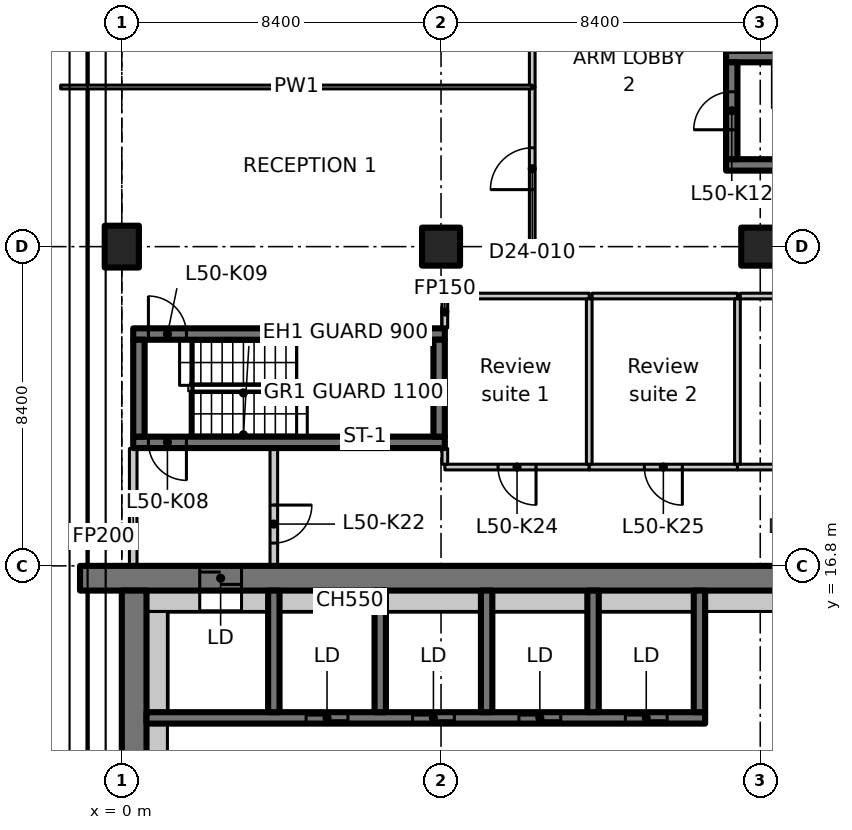
"""IFC4 building model, lengths in metres.
Left out: names, types, materials, properties, quantities, classifications, styles, units other than length and angle.
Written with IfcOpenShell. Run it as: python <this file> out.ifc"""

import sys

from ifc_helpers import new_model, si_unit, direction, frame, frame_2d, origin, origin_2d, place, context, subcontext, project, spatial, polyline, rectangle, outline, extrude, element, fill, save


model = new_model("IFC4")
c1 = context("Model", 3, precision=1e-05, world=origin(), true_north=direction((0.0, 1.0)))
c2 = subcontext(c1, "Body", "Model", "MODEL_VIEW")
j1 = project(units=[si_unit("LENGTHUNIT", "METRE"), si_unit("PLANEANGLEUNIT", "RADIAN")], contexts=[c1])
p1 = place(None, origin())
s1 = spatial("IfcSite", under=j1, at=p1, CompositionType="ELEMENT")
p2 = place(p1, origin())
s2 = spatial("IfcBuilding", under=s1, at=p2, CompositionType="ELEMENT")
p3 = place(p2, frame((0.0, 0.0, 199.2)))
s3 = spatial("IfcBuildingStorey", under=s2, at=p3, CompositionType="ELEMENT", Elevation=199.2)
p4 = place(p3, frame((0.0, 25.2, 0.0), z_axis=(0.0, 0.0, 1.0), x_axis=(1.0, 0.0, 0.0)))
e1 = element("IfcColumn", 1, at=p4, inside=s3, PredefinedType="COLUMN", context=c2, shape_type="SweptSolid", body=[
    extrude(rectangle(XDim=0.9, YDim=1.1, at=origin_2d()), origin(), (0.0, 0.0, 1.0), 3.35),
])
for number, where, z_axis, x_axis in (
    (2, (8.4, 25.2, 0.0), (0.0, 0.0, 1.0), (1.0, 0.0, 0.0)),
    (3, (16.8, 25.2, 0.0), (0.0, 0.0, 1.0), (1.0, 0.0, 0.0)),
):
    element("IfcColumn", number, at=place(p3, frame(where, z_axis=z_axis, x_axis=x_axis)), inside=s3, PredefinedType="COLUMN", context=c2, shape_type="SweptSolid", body=[
        extrude(rectangle(XDim=1.0, YDim=1.0, at=origin_2d()), origin(), (0.0, 0.0, 1.0), 3.35),
    ])
p5 = place(p3, frame((-1.1, 16.475, 0.0), z_axis=(0.0, 0.0, 1.0), x_axis=(1.0, 0.0, 0.0)))
e4 = element("IfcWall", 4, at=p5, inside=s3, PredefinedType="SHEAR", context=c2, shape_type="SweptSolid", body=[
    extrude(rectangle(XDim=22.1, YDim=0.65, at=frame_2d((11.05, 0.0))), origin(), (0.0, 0.0, 1.0), 3.35),
])
p6 = place(p5, frame((3.15, 0.0, 0.0)))
e5 = element("IfcOpeningElement", 5, at=p6, cuts=e4, PredefinedType="OPENING", context=c2, shape_type="SweptSolid", body=[
    extrude(rectangle(XDim=1.1, YDim=2.3, at=frame_2d((0.55, 1.15))), frame((0.0, 0.335, 0.0), z_axis=(0.0, -1.0, 0.0), x_axis=(1.0, 0.0, 0.0)), (0.0, 0.0, 1.0), 0.67),
])
p7 = place(p3, frame((0.325, 7.286, 0.0), z_axis=(0.0, 0.0, 1.0), x_axis=(0.0, 1.0, 0.0)))
e6 = element("IfcWall", 6, at=p7, inside=s3, PredefinedType="SHEAR", context=c2, shape_type="SweptSolid", body=[
    extrude(rectangle(XDim=8.864, YDim=0.65, at=frame_2d((4.432, 0.0))), origin(), (0.0, 0.0, 1.0), 3.35),
])
p8 = place(p3, frame((0.65, 15.875, 0.0), z_axis=(0.0, 0.0, 1.0), x_axis=(1.0, 0.0, 0.0)))
e7 = element("IfcWall", 7, at=p8, inside=s3, PredefinedType="PARTITIONING", context=c2, shape_type="SweptSolid", body=[
    extrude(rectangle(XDim=1.4, YDim=0.55, at=frame_2d((0.7, 0.0))), origin(), (0.0, 0.0, 1.0), 3.35),
])
p9 = place(p3, frame((0.65, 12.8, 0.0), z_axis=(0.0, 0.0, 1.0), x_axis=(1.0, 0.0, 0.0)))
e8 = element("IfcWall", 8, at=p9, inside=s3, PredefinedType="SHEAR", context=c2, shape_type="SweptSolid", body=[
    extrude(rectangle(XDim=14.7, YDim=0.3, at=frame_2d((7.35, 0.0))), origin(), (0.0, 0.0, 1.0), 3.35),
])
p10 = place(p9, frame((4.2, 0.0, 0.0)))
e9 = element("IfcOpeningElement", 9, at=p10, cuts=e8, PredefinedType="OPENING", context=c2, shape_type="SweptSolid", body=[
    extrude(rectangle(XDim=1.1, YDim=2.3, at=frame_2d((0.55, 1.15))), frame((0.0, 0.16, 0.0), z_axis=(0.0, -1.0, 0.0), x_axis=(1.0, 0.0, 0.0)), (0.0, 0.0, 1.0), 0.32),
])
p11 = place(p9, frame((7.0, 0.0, 0.0)))
e10 = element("IfcOpeningElement", 10, at=p11, cuts=e8, PredefinedType="OPENING", context=c2, shape_type="SweptSolid", body=[
    extrude(rectangle(XDim=1.1, YDim=2.3, at=frame_2d((0.55, 1.15))), frame((0.0, 0.16, 0.0), z_axis=(0.0, -1.0, 0.0), x_axis=(1.0, 0.0, 0.0)), (0.0, 0.0, 1.0), 0.32),
])
p12 = place(p9, frame((9.8, 0.0, 0.0)))
e11 = element("IfcOpeningElement", 11, at=p12, cuts=e8, PredefinedType="OPENING", context=c2, shape_type="SweptSolid", body=[
    extrude(rectangle(XDim=1.1, YDim=2.3, at=frame_2d((0.55, 1.15))), frame((0.0, 0.16, 0.0), z_axis=(0.0, -1.0, 0.0), x_axis=(1.0, 0.0, 0.0)), (0.0, 0.0, 1.0), 0.32),
])
p13 = place(p9, frame((12.6, 0.0, 0.0)))
e12 = element("IfcOpeningElement", 12, at=p13, cuts=e8, PredefinedType="OPENING", context=c2, shape_type="SweptSolid", body=[
    extrude(rectangle(XDim=1.1, YDim=2.3, at=frame_2d((0.55, 1.15))), frame((0.0, 0.16, 0.0), z_axis=(0.0, -1.0, 0.0), x_axis=(1.0, 0.0, 0.0)), (0.0, 0.0, 1.0), 0.32),
])
for number, where, z_axis, x_axis in (
    (13, (4.0, 12.95, 0.0), (0.0, 0.0, 1.0), (0.0, 1.0, 0.0)),
    (14, (6.8, 12.95, 0.0), (0.0, 0.0, 1.0), (0.0, 1.0, 0.0)),
    (15, (9.6, 12.95, 0.0), (0.0, 0.0, 1.0), (0.0, 1.0, 0.0)),
    (16, (12.4, 12.95, 0.0), (0.0, 0.0, 1.0), (0.0, 1.0, 0.0)),
    (17, (15.2, 12.95, 0.0), (0.0, 0.0, 1.0), (0.0, 1.0, 0.0)),
):
    element("IfcWall", number, at=place(p3, frame(where, z_axis=z_axis, x_axis=x_axis)), inside=s3, PredefinedType="SHEAR", context=c2, shape_type="SweptSolid", body=[
        extrude(rectangle(XDim=3.2, YDim=0.3, at=frame_2d((1.6, 0.0))), origin(), (0.0, 0.0, 1.0), 3.35),
    ])
p14 = place(p3, frame((8.5, 20.05, 0.0), z_axis=(0.0, 0.0, 1.0), x_axis=(-1.0, 0.0, 0.0)))
e18 = element("IfcWall", 18, at=p14, inside=s3, PredefinedType="SHEAR", context=c2, shape_type="SweptSolid", body=[
    extrude(rectangle(XDim=8.2, YDim=0.3, at=frame_2d((4.1, 0.0))), origin(), (0.0, 0.0, 1.0), 3.35),
])
p15 = place(p14, frame((6.8, 0.0, 0.0)))
e19 = element("IfcOpeningElement", 19, at=p15, cuts=e18, PredefinedType="OPENING", context=c2, shape_type="SweptSolid", body=[
    extrude(rectangle(XDim=1.0, YDim=2.1, at=frame_2d((0.5, 1.05))), frame((0.0, 0.16, 0.0), z_axis=(0.0, -1.0, 0.0), x_axis=(1.0, 0.0, 0.0)), (0.0, 0.0, 1.0), 0.32),
])
p16 = place(p3, frame((0.3, 22.9, 0.0), z_axis=(0.0, 0.0, 1.0), x_axis=(1.0, 0.0, 0.0)))
e20 = element("IfcWall", 20, at=p16, inside=s3, PredefinedType="SHEAR", context=c2, shape_type="SweptSolid", body=[
    extrude(rectangle(XDim=8.2, YDim=0.3, at=frame_2d((4.1, 0.0))), origin(), (0.0, 0.0, 1.0), 3.35),
])
p17 = place(p16, frame((0.4, 0.0, 0.0)))
e21 = element("IfcOpeningElement", 21, at=p17, cuts=e20, PredefinedType="OPENING", context=c2, shape_type="SweptSolid", body=[
    extrude(rectangle(XDim=1.0, YDim=2.1, at=frame_2d((0.5, 1.05))), frame((0.0, 0.16, 0.0), z_axis=(0.0, -1.0, 0.0), x_axis=(1.0, 0.0, 0.0)), (0.0, 0.0, 1.0), 0.32),
])
for number, where, z_axis, x_axis in (
    (22, (0.45, 20.2, 0.0), (0.0, 0.0, 1.0), (0.0, 1.0, 0.0)),
    (23, (8.35, 20.2, 0.0), (0.0, 0.0, 1.0), (0.0, 1.0, 0.0)),
):
    element("IfcWall", number, at=place(p3, frame(where, z_axis=z_axis, x_axis=x_axis)), inside=s3, PredefinedType="SHEAR", context=c2, shape_type="SweptSolid", body=[
        extrude(rectangle(XDim=2.55, YDim=0.3, at=frame_2d((1.275, 0.0))), origin(), (0.0, 0.0, 1.0), 3.35),
    ])
for number, where, z_axis, x_axis in (
    (24, (15.9, 27.35, 0.0), (0.0, 0.0, 1.0), (1.0, 0.0, 0.0)),
    (25, (15.9, 30.2, 0.0), (0.0, 0.0, 1.0), (1.0, 0.0, 0.0)),
):
    element("IfcWall", number, at=place(p3, frame(where, z_axis=z_axis, x_axis=x_axis)), inside=s3, PredefinedType="SHEAR", context=c2, shape_type="SweptSolid", body=[
        extrude(rectangle(XDim=8.2, YDim=0.3, at=frame_2d((4.1, 0.0))), origin(), (0.0, 0.0, 1.0), 3.35),
    ])
p18 = place(p3, frame((16.05, 27.5, 0.0), z_axis=(0.0, 0.0, 1.0), x_axis=(0.0, 1.0, 0.0)))
e26 = element("IfcWall", 26, at=p18, inside=s3, PredefinedType="SHEAR", context=c2, shape_type="SweptSolid", body=[
    extrude(rectangle(XDim=2.55, YDim=0.3, at=frame_2d((1.275, 0.0))), origin(), (0.0, 0.0, 1.0), 3.35),
])
p19 = place(p18, frame((0.775, 0.0, 0.0)))
e27 = element("IfcOpeningElement", 27, at=p19, cuts=e26, PredefinedType="OPENING", context=c2, shape_type="SweptSolid", body=[
    extrude(rectangle(XDim=1.0, YDim=2.1, at=frame_2d((0.5, 1.05))), frame((0.0, 0.16, 0.0), z_axis=(0.0, -1.0, 0.0), x_axis=(1.0, 0.0, 0.0)), (0.0, 0.0, 1.0), 0.32),
])
p20 = place(p3, frame((0.3, 16.812, 0.0), z_axis=(0.0, 0.0, 1.0), x_axis=(0.0, 1.0, 0.0)))
e28 = element("IfcWall", 28, at=p20, inside=s3, PredefinedType="PARTITIONING", context=c2, shape_type="SweptSolid", body=[
    extrude(rectangle(XDim=3.076, YDim=0.2, at=frame_2d((1.538, 0.0))), origin(), (0.0, 0.0, 1.0), 2.98),
])
p21 = place(p3, frame((4.0, 19.888, 0.0), z_axis=(0.0, 0.0, 1.0), x_axis=(0.0, -1.0, 0.0)))
e29 = element("IfcWall", 29, at=p21, inside=s3, PredefinedType="PARTITIONING", context=c2, shape_type="SweptSolid", body=[
    extrude(rectangle(XDim=3.076, YDim=0.2, at=frame_2d((1.538, 0.0))), origin(), (0.0, 0.0, 1.0), 3.35),
])
p22 = place(p21, frame((1.488, 0.0, 0.0)))
e30 = element("IfcOpeningElement", 30, at=p22, cuts=e29, PredefinedType="OPENING", context=c2, shape_type="SweptSolid", body=[
    extrude(rectangle(XDim=1.0, YDim=2.1, at=frame_2d((0.5, 1.05))), frame((0.0, 0.11, 0.0), z_axis=(0.0, -1.0, 0.0), x_axis=(1.0, 0.0, 0.0)), (0.0, 0.0, 1.0), 0.22),
])
p23 = place(p3, frame((12.3, 19.4, 0.0), z_axis=(0.0, 0.0, 1.0), x_axis=(-1.0, 0.0, 0.0)))
e31 = element("IfcWall", 31, at=p23, inside=s3, PredefinedType="PARTITIONING", context=c2, shape_type="SweptSolid", body=[
    extrude(rectangle(XDim=3.8, YDim=0.15, at=frame_2d((1.9, 0.0))), origin(), (0.0, 0.0, 1.0), 3.35),
])
p24 = place(p23, frame((1.4, 0.0, 0.0)))
e32 = element("IfcOpeningElement", 32, at=p24, cuts=e31, PredefinedType="OPENING", context=c2, shape_type="SweptSolid", body=[
    extrude(rectangle(XDim=1.0, YDim=2.1, at=frame_2d((0.5, 1.05))), frame((0.0, 0.085, 0.0), z_axis=(0.0, -1.0, 0.0), x_axis=(1.0, 0.0, 0.0)), (0.0, 0.0, 1.0), 0.17),
])
p25 = place(p3, frame((8.5, 19.475, 0.0), z_axis=(0.0, 0.0, 1.0), x_axis=(0.0, 1.0, 0.0)))
e33 = element("IfcWall", 33, at=p25, inside=s3, PredefinedType="PARTITIONING", context=c2, shape_type="SweptSolid", body=[
    extrude(rectangle(XDim=0.413, YDim=0.15, at=frame_2d((0.207, 0.0))), origin(), (0.0, 0.0, 1.0), 3.35),
])
p26 = place(p3, frame((8.5, 23.062, 0.0), z_axis=(0.0, 0.0, 1.0), x_axis=(0.0, 1.0, 0.0)))
e34 = element("IfcWall", 34, at=p26, inside=s3, PredefinedType="PARTITIONING", context=c2, shape_type="SweptSolid", body=[
    extrude(rectangle(XDim=0.838, YDim=0.15, at=frame_2d((0.419, 0.0))), origin(), (0.0, 0.0, 1.0), 3.35),
])
p27 = place(p3, frame((8.575, 23.9, 0.0), z_axis=(0.0, 0.0, 1.0), x_axis=(1.0, 0.0, 0.0)))
e35 = element("IfcWall", 35, at=p27, inside=s3, PredefinedType="PARTITIONING", context=c2, shape_type="SweptSolid", body=[
    extrude(rectangle(XDim=3.725, YDim=0.15, at=frame_2d((1.863, 0.0))), origin(), (0.0, 0.0, 1.0), 3.35),
])
p28 = place(p3, frame((16.2, 19.4, 0.0), z_axis=(0.0, 0.0, 1.0), x_axis=(-1.0, 0.0, 0.0)))
e36 = element("IfcWall", 36, at=p28, inside=s3, PredefinedType="PARTITIONING", context=c2, shape_type="SweptSolid", body=[
    extrude(rectangle(XDim=3.9, YDim=0.15, at=frame_2d((1.95, 0.0))), origin(), (0.0, 0.0, 1.0), 3.35),
])
p29 = place(p28, frame((1.45, 0.0, 0.0)))
e37 = element("IfcOpeningElement", 37, at=p29, cuts=e36, PredefinedType="OPENING", context=c2, shape_type="SweptSolid", body=[
    extrude(rectangle(XDim=1.0, YDim=2.1, at=frame_2d((0.5, 1.05))), frame((0.0, 0.085, 0.0), z_axis=(0.0, -1.0, 0.0), x_axis=(1.0, 0.0, 0.0)), (0.0, 0.0, 1.0), 0.17),
])
p30 = place(p3, frame((12.3, 23.825, 0.0), z_axis=(0.0, 0.0, 1.0), x_axis=(0.0, -1.0, 0.0)))
e38 = element("IfcWall", 38, at=p30, inside=s3, PredefinedType="PARTITIONING", context=c2, shape_type="SweptSolid", body=[
    extrude(rectangle(XDim=4.35, YDim=0.15, at=frame_2d((2.175, 0.0))), origin(), (0.0, 0.0, 1.0), 3.35),
])
p31 = place(p3, frame((12.375, 23.9, 0.0), z_axis=(0.0, 0.0, 1.0), x_axis=(1.0, 0.0, 0.0)))
e39 = element("IfcWall", 39, at=p31, inside=s3, PredefinedType="PARTITIONING", context=c2, shape_type="SweptSolid", body=[
    extrude(rectangle(XDim=3.825, YDim=0.15, at=frame_2d((1.913, 0.0))), origin(), (0.0, 0.0, 1.0), 3.35),
])
p32 = place(p3, frame((19.925, 19.4, 0.0), z_axis=(0.0, 0.0, 1.0), x_axis=(-1.0, 0.0, 0.0)))
e40 = element("IfcWall", 40, at=p32, inside=s3, PredefinedType="PARTITIONING", context=c2, shape_type="SweptSolid", body=[
    extrude(rectangle(XDim=3.725, YDim=0.15, at=frame_2d((1.863, 0.0))), origin(), (0.0, 0.0, 1.0), 3.35),
])
p33 = place(p32, frame((1.325, 0.0, 0.0)))
e41 = element("IfcOpeningElement", 41, at=p33, cuts=e40, PredefinedType="OPENING", context=c2, shape_type="SweptSolid", body=[
    extrude(rectangle(XDim=1.0, YDim=2.1, at=frame_2d((0.5, 1.05))), frame((0.0, 0.085, 0.0), z_axis=(0.0, -1.0, 0.0), x_axis=(1.0, 0.0, 0.0)), (0.0, 0.0, 1.0), 0.17),
])
p34 = place(p3, frame((16.2, 23.825, 0.0), z_axis=(0.0, 0.0, 1.0), x_axis=(0.0, -1.0, 0.0)))
e42 = element("IfcWall", 42, at=p34, inside=s3, PredefinedType="PARTITIONING", context=c2, shape_type="SweptSolid", body=[
    extrude(rectangle(XDim=4.35, YDim=0.15, at=frame_2d((2.175, 0.0))), origin(), (0.0, 0.0, 1.0), 3.35),
])
p35 = place(p3, frame((16.275, 23.9, 0.0), z_axis=(0.0, 0.0, 1.0), x_axis=(1.0, 0.0, 0.0)))
e43 = element("IfcWall", 43, at=p35, inside=s3, PredefinedType="PARTITIONING", context=c2, shape_type="SweptSolid", body=[
    extrude(rectangle(XDim=3.725, YDim=0.15, at=frame_2d((1.863, 0.0))), origin(), (0.0, 0.0, 1.0), 3.35),
])
p36 = place(p3, frame((0.925, 7.286, 0.0), z_axis=(0.0, 0.0, 1.0), x_axis=(0.0, 1.0, 0.0)))
e44 = element("IfcWall", 44, at=p36, inside=s3, PredefinedType="PARTITIONING", context=c2, shape_type="SweptSolid", body=[
    extrude(rectangle(XDim=5.364, YDim=0.55, at=frame_2d((2.682, 0.0))), origin(), (0.0, 0.0, 1.0), 3.35),
])
p37 = place(p3, frame((0.925, 12.95, 0.0), z_axis=(0.0, 0.0, 1.0), x_axis=(0.0, 1.0, 0.0)))
e45 = element("IfcWall", 45, at=p37, inside=s3, PredefinedType="PARTITIONING", context=c2, shape_type="SweptSolid", body=[
    extrude(rectangle(XDim=2.65, YDim=0.55, at=frame_2d((1.325, 0.0))), origin(), (0.0, 0.0, 1.0), 3.35),
])
p38 = place(p3, frame((3.15, 15.875, 0.0), z_axis=(0.0, 0.0, 1.0), x_axis=(1.0, 0.0, 0.0)))
e46 = element("IfcWall", 46, at=p38, inside=s3, PredefinedType="PARTITIONING", context=c2, shape_type="SweptSolid", body=[
    extrude(rectangle(XDim=0.7, YDim=0.55, at=frame_2d((0.35, 0.0))), origin(), (0.0, 0.0, 1.0), 3.35),
])
for number, where, z_axis, x_axis in (
    (47, (4.15, 15.875, 0.0), (0.0, 0.0, 1.0), (1.0, 0.0, 0.0)),
    (48, (6.95, 15.875, 0.0), (0.0, 0.0, 1.0), (1.0, 0.0, 0.0)),
    (49, (9.75, 15.875, 0.0), (0.0, 0.0, 1.0), (1.0, 0.0, 0.0)),
    (50, (12.55, 15.875, 0.0), (0.0, 0.0, 1.0), (1.0, 0.0, 0.0)),
    (51, (15.35, 15.875, 0.0), (0.0, 0.0, 1.0), (1.0, 0.0, 0.0)),
):
    element("IfcWall", number, at=place(p3, frame(where, z_axis=z_axis, x_axis=x_axis)), inside=s3, PredefinedType="PARTITIONING", context=c2, shape_type="SweptSolid", body=[
        extrude(rectangle(XDim=2.5, YDim=0.55, at=frame_2d((1.25, 0.0))), origin(), (0.0, 0.0, 1.0), 3.35),
    ])
p39 = place(p3, frame((10.8, 25.2, 0.0), z_axis=(0.0, 0.0, 1.0), x_axis=(0.0, 1.0, 0.0)))
e52 = element("IfcWall", 52, at=p39, inside=s3, PredefinedType="PARTITIONING", context=c2, shape_type="SweptSolid", body=[
    extrude(rectangle(XDim=4.2, YDim=0.15, at=frame_2d((2.1, 0.0))), origin(), (0.0, 0.0, 1.0), 3.33),
])
p40 = place(p39, frame((1.5, 0.0, 0.0)))
e53 = element("IfcOpeningElement", 53, at=p40, cuts=e52, PredefinedType="OPENING", context=c2, shape_type="SweptSolid", body=[
    extrude(rectangle(XDim=1.1, YDim=2.1, at=frame_2d((0.55, 1.05))), frame((0.0, 0.085, 0.0), z_axis=(0.0, -1.0, 0.0), x_axis=(1.0, 0.0, 0.0)), (0.0, 0.0, 1.0), 0.17),
])
p41 = place(p3, frame((10.8, 29.4, 0.0), z_axis=(0.0, 0.0, 1.0), x_axis=(0.0, 1.0, 0.0)))
e54 = element("IfcWall", 54, at=p41, inside=s3, PredefinedType="PARTITIONING", context=c2, shape_type="SweptSolid", body=[
    extrude(rectangle(XDim=4.2, YDim=0.15, at=frame_2d((2.1, 0.0))), origin(), (0.0, 0.0, 1.0), 3.33),
])
p42 = place(p3, frame((-1.609, 29.4, 0.0), z_axis=(0.0, 0.0, 1.0), x_axis=(1.0, 0.0, 0.0)))
e55 = element("IfcWall", 55, at=p42, inside=s3, PredefinedType="PARTITIONING", context=c2, shape_type="SweptSolid", body=[
    extrude(outline(polyline([(0.0, 0.0), (12.409, 0.0), (12.409, 3.33), (2.059, 3.33), (2.057, 2.98), (1.161, 2.98), (1.159, 3.33), (0.509, 3.33), (0.0, 3.33), (0.0, 0.0)])), frame((0.0, 0.05, 0.0), z_axis=(0.0, -1.0, 0.0), x_axis=(1.0, 0.0, 0.0)), (0.0, 0.0, 1.0), 0.1),
])
p43 = place(p6, origin())
e56 = element("IfcDoor", 56, at=p43, inside=s3, OperationType="SLIDING_TO_LEFT", PredefinedType="DOOR", context=c2, shape_type="SweptSolid", body=[
    extrude(rectangle(XDim=1.1, YDim=2.3, at=frame_2d((0.55, 1.15))), frame((0.0, 0.025, 0.0), z_axis=(0.0, -1.0, 0.0), x_axis=(1.0, 0.0, 0.0)), (0.0, 0.0, 1.0), 0.05),
])
fill(e5, e56)
p44 = place(p10, origin())
e57 = element("IfcDoor", 57, at=p44, inside=s3, OperationType="SLIDING_TO_LEFT", PredefinedType="DOOR", context=c2, shape_type="SweptSolid", body=[
    extrude(rectangle(XDim=1.1, YDim=2.3, at=frame_2d((0.55, 1.15))), frame((0.0, 0.025, 0.0), z_axis=(0.0, -1.0, 0.0), x_axis=(1.0, 0.0, 0.0)), (0.0, 0.0, 1.0), 0.05),
])
fill(e9, e57)
p45 = place(p11, origin())
e58 = element("IfcDoor", 58, at=p45, inside=s3, OperationType="SLIDING_TO_LEFT", PredefinedType="DOOR", context=c2, shape_type="SweptSolid", body=[
    extrude(rectangle(XDim=1.1, YDim=2.3, at=frame_2d((0.55, 1.15))), frame((0.0, 0.025, 0.0), z_axis=(0.0, -1.0, 0.0), x_axis=(1.0, 0.0, 0.0)), (0.0, 0.0, 1.0), 0.05),
])
fill(e10, e58)
p46 = place(p12, origin())
e59 = element("IfcDoor", 59, at=p46, inside=s3, OperationType="SLIDING_TO_LEFT", PredefinedType="DOOR", context=c2, shape_type="SweptSolid", body=[
    extrude(rectangle(XDim=1.1, YDim=2.3, at=frame_2d((0.55, 1.15))), frame((0.0, 0.025, 0.0), z_axis=(0.0, -1.0, 0.0), x_axis=(1.0, 0.0, 0.0)), (0.0, 0.0, 1.0), 0.05),
])
fill(e11, e59)
p47 = place(p13, origin())
e60 = element("IfcDoor", 60, at=p47, inside=s3, OperationType="SLIDING_TO_LEFT", PredefinedType="DOOR", context=c2, shape_type="SweptSolid", body=[
    extrude(rectangle(XDim=1.1, YDim=2.3, at=frame_2d((0.55, 1.15))), frame((0.0, 0.025, 0.0), z_axis=(0.0, -1.0, 0.0), x_axis=(1.0, 0.0, 0.0)), (0.0, 0.0, 1.0), 0.05),
])
fill(e12, e60)
p48 = place(p15, origin())
e61 = element("IfcDoor", 61, at=p48, inside=s3, OperationType="SINGLE_SWING_LEFT", PredefinedType="DOOR", context=c2, shape_type="SweptSolid", body=[
    extrude(rectangle(XDim=1.0, YDim=2.1, at=frame_2d((0.5, 1.05))), frame((0.0, 0.025, 0.0), z_axis=(0.0, -1.0, 0.0), x_axis=(1.0, 0.0, 0.0)), (0.0, 0.0, 1.0), 0.05),
])
fill(e19, e61)
p49 = place(p17, origin())
e62 = element("IfcDoor", 62, at=p49, inside=s3, OperationType="SINGLE_SWING_RIGHT", PredefinedType="DOOR", context=c2, shape_type="SweptSolid", body=[
    extrude(rectangle(XDim=1.0, YDim=2.1, at=frame_2d((0.5, 1.05))), frame((0.0, 0.025, 0.0), z_axis=(0.0, -1.0, 0.0), x_axis=(1.0, 0.0, 0.0)), (0.0, 0.0, 1.0), 0.05),
])
fill(e21, e62)
p50 = place(p19, origin())
e63 = element("IfcDoor", 63, at=p50, inside=s3, OperationType="SINGLE_SWING_LEFT", PredefinedType="DOOR", context=c2, shape_type="SweptSolid", body=[
    extrude(rectangle(XDim=1.0, YDim=2.1, at=frame_2d((0.5, 1.05))), frame((0.0, 0.025, 0.0), z_axis=(0.0, -1.0, 0.0), x_axis=(1.0, 0.0, 0.0)), (0.0, 0.0, 1.0), 0.05),
])
fill(e27, e63)
p51 = place(p22, origin())
e64 = element("IfcDoor", 64, at=p51, inside=s3, OperationType="SINGLE_SWING_LEFT", PredefinedType="DOOR", context=c2, shape_type="SweptSolid", body=[
    extrude(rectangle(XDim=1.0, YDim=2.1, at=frame_2d((0.5, 1.05))), frame((0.0, 0.025, 0.0), z_axis=(0.0, -1.0, 0.0), x_axis=(1.0, 0.0, 0.0)), (0.0, 0.0, 1.0), 0.05),
])
fill(e30, e64)
p52 = place(p24, origin())
e65 = element("IfcDoor", 65, at=p52, inside=s3, OperationType="SINGLE_SWING_LEFT", PredefinedType="DOOR", context=c2, shape_type="SweptSolid", body=[
    extrude(rectangle(XDim=1.0, YDim=2.1, at=frame_2d((0.5, 1.05))), frame((0.0, 0.025, 0.0), z_axis=(0.0, -1.0, 0.0), x_axis=(1.0, 0.0, 0.0)), (0.0, 0.0, 1.0), 0.05),
])
fill(e32, e65)
p53 = place(p29, origin())
e66 = element("IfcDoor", 66, at=p53, inside=s3, OperationType="SINGLE_SWING_RIGHT", PredefinedType="DOOR", context=c2, shape_type="SweptSolid", body=[
    extrude(rectangle(XDim=1.0, YDim=2.1, at=frame_2d((0.5, 1.05))), frame((0.0, 0.025, 0.0), z_axis=(0.0, -1.0, 0.0), x_axis=(1.0, 0.0, 0.0)), (0.0, 0.0, 1.0), 0.05),
])
fill(e37, e66)
p54 = place(p40, origin())
e67 = element("IfcDoor", 67, at=p54, inside=s3, OperationType="SINGLE_SWING_LEFT", PredefinedType="DOOR", context=c2, shape_type="SweptSolid", body=[
    extrude(rectangle(XDim=1.1, YDim=2.1, at=frame_2d((0.55, 1.05))), frame((0.0, 0.025, 0.0), z_axis=(0.0, -1.0, 0.0), x_axis=(1.0, 0.0, 0.0)), (0.0, 0.0, 1.0), 0.05),
])
fill(e53, e67)
save(model, sys.argv[1])
